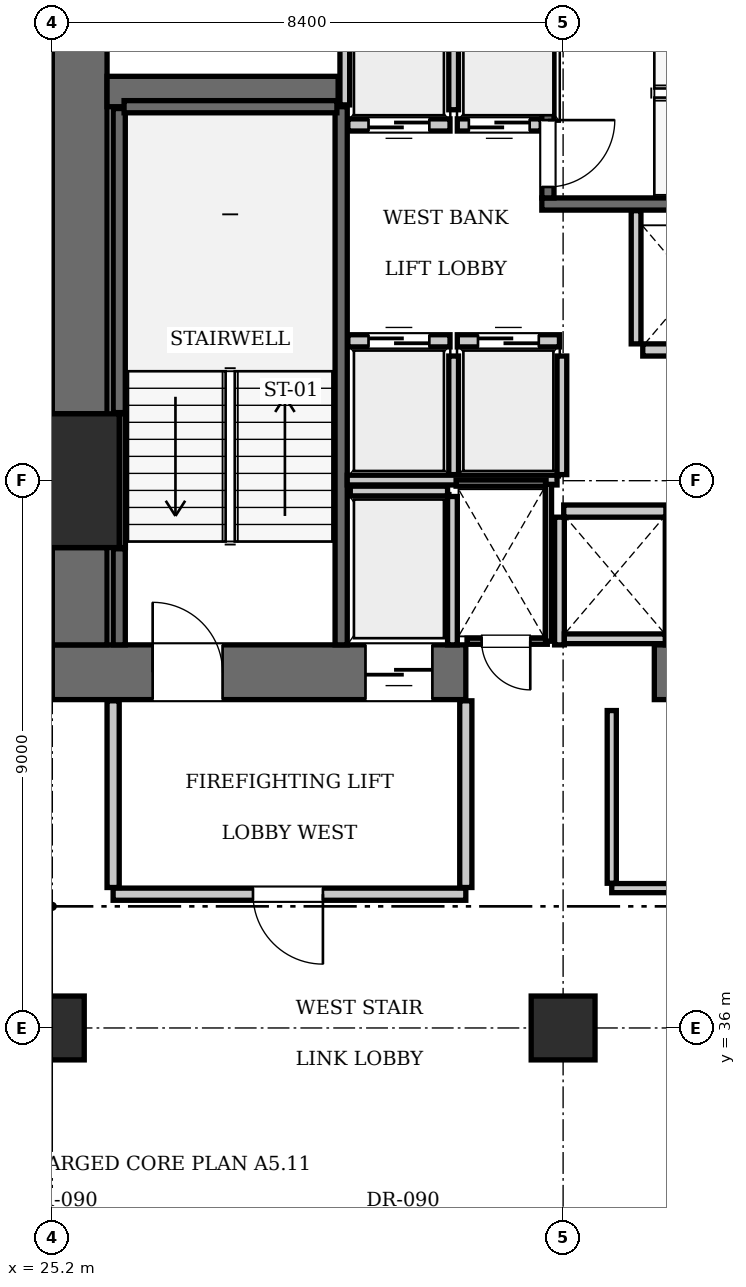
"""IFC4 building model, lengths in metres.
Left out: names, types, materials, properties, quantities, classifications, styles, units other than length and angle.
Written with IfcOpenShell. Run it as: python <this file> out.ifc"""

import sys

from ifc_helpers import new_model, si_unit, direction, frame, frame_2d, origin, origin_2d, place, context, subcontext, project, spatial, rectangle, extrude, element, fill, save


model = new_model("IFC4")
c1 = context("Model", 3, precision=1e-05, world=origin(), true_north=direction((0.0, 1.0)))
c2 = subcontext(c1, "Body", "Model", "MODEL_VIEW")
j1 = project(units=[si_unit("LENGTHUNIT", "METRE"), si_unit("PLANEANGLEUNIT", "RADIAN")], contexts=[c1])
p1 = place(None, origin())
s1 = spatial("IfcSite", under=j1, at=p1, CompositionType="ELEMENT")
p2 = place(p1, origin())
s2 = spatial("IfcBuilding", under=s1, at=p2, CompositionType="ELEMENT")
p3 = place(p2, frame((0.0, 0.0, 96.25)))
s3 = spatial("IfcBuildingStorey", under=s2, at=p3, CompositionType="ELEMENT", Elevation=96.25)
p4 = place(p3, frame((25.2, 45.0, 0.0), z_axis=(0.0, 0.0, 1.0), x_axis=(1.0, 0.0, 0.0)))
e1 = element("IfcColumn", 1, at=p4, inside=s3, PredefinedType="COLUMN", context=c2, shape_type="SweptSolid", body=[
    extrude(rectangle(XDim=2.2, YDim=2.2, at=origin_2d()), origin(), (0.0, 0.0, 1.0), 3.85),
])
p5 = place(p3, frame((25.2, 41.85, 0.0), z_axis=(0.0, 0.0, 1.0), x_axis=(1.0, 0.0, 0.0)))
e2 = element("IfcWall", 2, at=p5, inside=s3, PredefinedType="SHEAR", context=c2, shape_type="SweptSolid", body=[
    extrude(rectangle(XDim=6.8, YDim=0.9, at=frame_2d((3.4, 0.0))), origin(), (0.0, 0.0, 1.0), 3.85),
])
p6 = place(p5, frame((1.65, 0.0, 0.0)))
e3 = element("IfcOpeningElement", 3, at=p6, cuts=e2, PredefinedType="OPENING", context=c2, shape_type="SweptSolid", body=[
    extrude(rectangle(XDim=1.15, YDim=2.15, at=frame_2d((0.575, 1.075))), frame((0.0, 0.46, 0.0), z_axis=(0.0, -1.0, 0.0), x_axis=(1.0, 0.0, 0.0)), (0.0, 0.0, 1.0), 0.92),
])
p7 = place(p5, frame((5.15, 0.0, 0.0)))
e4 = element("IfcOpeningElement", 4, at=p7, cuts=e2, PredefinedType="OPENING", context=c2, shape_type="SweptSolid", body=[
    extrude(rectangle(XDim=1.1, YDim=2.2, at=frame_2d((0.55, 1.1))), frame((0.0, 0.46, 0.0), z_axis=(0.0, -1.0, 0.0), x_axis=(1.0, 0.0, 0.0)), (0.0, 0.0, 1.0), 0.92),
])
p8 = place(p3, frame((35.1, 41.85, 0.0), z_axis=(0.0, 0.0, 1.0), x_axis=(1.0, 0.0, 0.0)))
e5 = element("IfcWall", 5, at=p8, inside=s3, PredefinedType="SHEAR", context=c2, shape_type="SweptSolid", body=[
    extrude(rectangle(XDim=5.4, YDim=0.9, at=frame_2d((2.7, 0.0))), origin(), (0.0, 0.0, 1.0), 3.85),
])
p9 = place(p3, frame((25.65, 42.3, 0.0), z_axis=(0.0, 0.0, 1.0), x_axis=(0.0, 1.0, 0.0)))
e6 = element("IfcWall", 6, at=p9, inside=s3, PredefinedType="SHEAR", context=c2, shape_type="SweptSolid", body=[
    extrude(rectangle(XDim=1.6, YDim=0.9, at=frame_2d((0.8, 0.0))), origin(), (0.0, 0.0, 1.0), 3.85),
])
p10 = place(p3, frame((25.65, 46.1, 0.0), z_axis=(0.0, 0.0, 1.0), x_axis=(0.0, 1.0, 0.0)))
e7 = element("IfcWall", 7, at=p10, inside=s3, PredefinedType="SHEAR", context=c2, shape_type="SweptSolid", body=[
    extrude(rectangle(XDim=7.0, YDim=0.9, at=frame_2d((3.5, 0.0))), origin(), (0.0, 0.0, 1.0), 3.85),
])
p11 = place(p3, frame((26.1, 51.4, 0.0), z_axis=(0.0, 0.0, 1.0), x_axis=(1.0, 0.0, 0.0)))
e8 = element("IfcWall", 8, at=p11, inside=s3, PredefinedType="SHEAR", context=c2, shape_type="SweptSolid", body=[
    extrude(rectangle(XDim=3.8, YDim=0.5, at=frame_2d((1.9, 0.0))), origin(), (0.0, 0.0, 1.0), 3.85),
])
for number, where, z_axis, x_axis in (
    (9, (25.2, 36.0, 0.0), (0.0, 0.0, 1.0), (1.0, 0.0, 0.0)),
    (10, (33.6, 36.0, 0.0), (0.0, 0.0, 1.0), (1.0, 0.0, 0.0)),
):
    element("IfcColumn", number, at=place(p3, frame(where, z_axis=z_axis, x_axis=x_axis)), inside=s3, PredefinedType="COLUMN", context=c2, shape_type="SweptSolid", body=[
        extrude(rectangle(XDim=1.05, YDim=1.05, at=origin_2d()), origin(), (0.0, 0.0, 1.0), 3.85),
    ])
p12 = place(p3, frame((29.95, 42.3, 0.0), z_axis=(0.0, 0.0, 1.0), x_axis=(0.0, 1.0, 0.0)))
e11 = element("IfcWall", 11, at=p12, inside=s3, PredefinedType="SOLIDWALL", context=c2, shape_type="SweptSolid", body=[
    extrude(rectangle(XDim=8.85, YDim=0.2, at=frame_2d((4.425, 0.0))), origin(), (0.0, 0.0, 1.0), 3.61),
])
p13 = place(p3, frame((26.3, 42.3, 0.0), z_axis=(0.0, 0.0, 1.0), x_axis=(0.0, 1.0, 0.0)))
e12 = element("IfcWall", 12, at=p13, inside=s3, PredefinedType="SOLIDWALL", context=c2, shape_type="SweptSolid", body=[
    extrude(rectangle(XDim=1.58, YDim=0.2, at=frame_2d((0.79, 0.0))), origin(), (0.0, 0.0, 1.0), 3.61),
])
p14 = place(p3, frame((26.3, 46.12, 0.0), z_axis=(0.0, 0.0, 1.0), x_axis=(0.0, 1.0, 0.0)))
e13 = element("IfcWall", 13, at=p14, inside=s3, PredefinedType="SOLIDWALL", context=c2, shape_type="SweptSolid", body=[
    extrude(rectangle(XDim=5.0, YDim=0.2, at=frame_2d((2.5, 0.0))), origin(), (0.0, 0.0, 1.0), 3.61),
])
p15 = place(p3, frame((26.38, 51.15, 0.0), z_axis=(0.0, 0.0, 1.0), x_axis=(1.0, 0.0, 0.0)))
e14 = element("IfcWall", 14, at=p15, inside=s3, PredefinedType="SOLIDWALL", context=c2, shape_type="SweptSolid", body=[
    extrude(rectangle(XDim=3.5, YDim=0.2, at=frame_2d((1.75, 0.0))), origin(), (0.0, 0.0, 1.0), 3.61),
])
p16 = place(p3, frame((26.352, 43.9, 0.0), z_axis=(0.0, 0.0, 1.0), x_axis=(0.0, 1.0, 0.0)))
e15 = element("IfcWall", 15, at=p16, inside=s3, PredefinedType="SOLIDWALL", context=c2, shape_type="SweptSolid", body=[
    extrude(rectangle(XDim=2.2, YDim=0.1, at=frame_2d((1.1, 0.0))), origin(), (0.0, 0.0, 1.0), 3.61),
])
p17 = place(p3, frame((33.25, 49.55, 0.0), z_axis=(0.0, 0.0, 1.0), x_axis=(1.0, 0.0, 0.0)))
e16 = element("IfcWall", 16, at=p17, inside=s3, PredefinedType="SOLIDWALL", context=c2, shape_type="SweptSolid", body=[
    extrude(rectangle(XDim=9.1, YDim=0.2, at=frame_2d((4.55, 0.0))), origin(), (0.0, 0.0, 1.0), 3.61),
])
p18 = place(p3, frame((33.35, 49.65, 0.0), z_axis=(0.0, 0.0, 1.0), x_axis=(0.0, 1.0, 0.0)))
e17 = element("IfcWall", 17, at=p18, inside=s3, PredefinedType="SOLIDWALL", context=c2, shape_type="SweptSolid", body=[
    extrude(rectangle(XDim=3.45, YDim=0.2, at=frame_2d((1.725, 0.0))), origin(), (0.0, 0.0, 1.0), 3.61),
])
p19 = place(p18, frame((0.18, 0.0, 0.0)))
e18 = element("IfcOpeningElement", 18, at=p19, cuts=e17, PredefinedType="OPENING", context=c2, shape_type="SweptSolid", body=[
    extrude(rectangle(XDim=1.1, YDim=2.15, at=frame_2d((0.55, 1.075))), frame((0.0, 0.11, 0.0), z_axis=(0.0, -1.0, 0.0), x_axis=(1.0, 0.0, 0.0)), (0.0, 0.0, 1.0), 0.22),
])
p20 = place(p3, frame((30.06, 47.3, 0.0), z_axis=(0.0, 0.0, 1.0), x_axis=(1.0, 0.0, 0.0)))
e19 = element("IfcWall", 19, at=p20, inside=s3, PredefinedType="SOLIDWALL", context=c2, shape_type="SweptSolid", body=[
    extrude(rectangle(XDim=1.68, YDim=0.2, at=frame_2d((0.84, 0.0))), origin(), (0.0, 0.0, 1.0), 3.61),
])
p21 = place(p20, frame((0.34, 0.0, 0.0)))
e20 = element("IfcOpeningElement", 20, at=p21, cuts=e19, PredefinedType="OPENING", context=c2, shape_type="SweptSolid", body=[
    extrude(rectangle(XDim=1.0, YDim=2.15, at=frame_2d((0.5, 1.075))), frame((0.0, 0.11, 0.0), z_axis=(0.0, -1.0, 0.0), x_axis=(1.0, 0.0, 0.0)), (0.0, 0.0, 1.0), 0.22),
])
p22 = place(p3, frame((31.86, 47.3, 0.0), z_axis=(0.0, 0.0, 1.0), x_axis=(1.0, 0.0, 0.0)))
e21 = element("IfcWall", 21, at=p22, inside=s3, PredefinedType="SOLIDWALL", context=c2, shape_type="SweptSolid", body=[
    extrude(rectangle(XDim=1.68, YDim=0.2, at=frame_2d((0.84, 0.0))), origin(), (0.0, 0.0, 1.0), 3.61),
])
p23 = place(p22, frame((0.34, 0.0, 0.0)))
e22 = element("IfcOpeningElement", 22, at=p23, cuts=e21, PredefinedType="OPENING", context=c2, shape_type="SweptSolid", body=[
    extrude(rectangle(XDim=1.0, YDim=2.15, at=frame_2d((0.5, 1.075))), frame((0.0, 0.11, 0.0), z_axis=(0.0, -1.0, 0.0), x_axis=(1.0, 0.0, 0.0)), (0.0, 0.0, 1.0), 0.22),
])
p24 = place(p3, frame((30.06, 50.85, 0.0), z_axis=(0.0, 0.0, 1.0), x_axis=(1.0, 0.0, 0.0)))
e23 = element("IfcWall", 23, at=p24, inside=s3, PredefinedType="SOLIDWALL", context=c2, shape_type="SweptSolid", body=[
    extrude(rectangle(XDim=1.68, YDim=0.2, at=frame_2d((0.84, 0.0))), origin(), (0.0, 0.0, 1.0), 3.61),
])
p25 = place(p24, frame((0.34, 0.0, 0.0)))
e24 = element("IfcOpeningElement", 24, at=p25, cuts=e23, PredefinedType="OPENING", context=c2, shape_type="SweptSolid", body=[
    extrude(rectangle(XDim=1.0, YDim=2.15, at=frame_2d((0.5, 1.075))), frame((0.0, 0.11, 0.0), z_axis=(0.0, -1.0, 0.0), x_axis=(1.0, 0.0, 0.0)), (0.0, 0.0, 1.0), 0.22),
])
p26 = place(p3, frame((31.86, 50.85, 0.0), z_axis=(0.0, 0.0, 1.0), x_axis=(1.0, 0.0, 0.0)))
e25 = element("IfcWall", 25, at=p26, inside=s3, PredefinedType="SOLIDWALL", context=c2, shape_type="SweptSolid", body=[
    extrude(rectangle(XDim=1.38, YDim=0.2, at=frame_2d((0.69, 0.0))), origin(), (0.0, 0.0, 1.0), 3.61),
])
p27 = place(p26, frame((0.19, 0.0, 0.0)))
e26 = element("IfcOpeningElement", 26, at=p27, cuts=e25, PredefinedType="OPENING", context=c2, shape_type="SweptSolid", body=[
    extrude(rectangle(XDim=1.0, YDim=2.15, at=frame_2d((0.5, 1.075))), frame((0.0, 0.11, 0.0), z_axis=(0.0, -1.0, 0.0), x_axis=(1.0, 0.0, 0.0)), (0.0, 0.0, 1.0), 0.22),
])
p28 = place(p3, frame((34.91, 47.15, 0.0), z_axis=(0.0, 0.0, 1.0), x_axis=(1.0, 0.0, 0.0)))
e27 = element("IfcWall", 27, at=p28, inside=s3, PredefinedType="SOLIDWALL", context=c2, shape_type="SweptSolid", body=[
    extrude(rectangle(XDim=1.68, YDim=0.2, at=frame_2d((0.84, 0.0))), origin(), (0.0, 0.0, 1.0), 3.61),
])
p29 = place(p3, frame((33.61, 44.5, 0.0), z_axis=(0.0, 0.0, 1.0), x_axis=(1.0, 0.0, 0.0)))
e28 = element("IfcWall", 28, at=p29, inside=s3, PredefinedType="SOLIDWALL", context=c2, shape_type="SweptSolid", body=[
    extrude(rectangle(XDim=1.68, YDim=0.2, at=frame_2d((0.84, 0.0))), origin(), (0.0, 0.0, 1.0), 3.61),
])
p30 = place(p3, frame((30.1, 44.83, 0.0), z_axis=(0.0, 0.0, 1.0), x_axis=(1.0, 0.0, 0.0)))
e29 = element("IfcWall", 29, at=p30, inside=s3, PredefinedType="SOLIDWALL", context=c2, shape_type="SweptSolid", body=[
    extrude(rectangle(XDim=1.6, YDim=0.16, at=frame_2d((0.8, 0.0))), origin(), (0.0, 0.0, 1.0), 3.61),
])
p31 = place(p3, frame((31.78, 42.3, 0.0), z_axis=(0.0, 0.0, 1.0), x_axis=(0.0, 1.0, 0.0)))
e30 = element("IfcWall", 30, at=p31, inside=s3, PredefinedType="SOLIDWALL", context=c2, shape_type="SweptSolid", body=[
    extrude(rectangle(XDim=2.44, YDim=0.16, at=frame_2d((1.22, 0.0))), origin(), (0.0, 0.0, 1.0), 3.61),
])
for number, where, z_axis, x_axis in (
    (31, (31.8, 45.1, 0.0), (0.0, 0.0, 1.0), (0.0, 1.0, 0.0)),
    (32, (33.58, 45.1, 0.0), (0.0, 0.0, 1.0), (0.0, 1.0, 0.0)),
):
    element("IfcWall", number, at=place(p3, frame(where, z_axis=z_axis, x_axis=x_axis)), inside=s3, PredefinedType="SOLIDWALL", context=c2, shape_type="SweptSolid", body=[
        extrude(rectangle(XDim=1.95, YDim=0.16, at=frame_2d((0.975, 0.0))), origin(), (0.0, 0.0, 1.0), 3.61),
    ])
p32 = place(p3, frame((30.05, 45.01, 0.0), z_axis=(0.0, 0.0, 1.0), x_axis=(1.0, 0.0, 0.0)))
e33 = element("IfcWall", 33, at=p32, inside=s3, PredefinedType="SOLIDWALL", context=c2, shape_type="SweptSolid", body=[
    extrude(rectangle(XDim=3.45, YDim=0.16, at=frame_2d((1.725, 0.0))), origin(), (0.0, 0.0, 1.0), 3.61),
])
p33 = place(p3, frame((30.01, 51.18, 0.0), z_axis=(0.0, 0.0, 1.0), x_axis=(0.0, 1.0, 0.0)))
e34 = element("IfcWall", 34, at=p33, inside=s3, PredefinedType="SOLIDWALL", context=c2, shape_type="SweptSolid", body=[
    extrude(rectangle(XDim=1.92, YDim=0.16, at=frame_2d((0.96, 0.0))), origin(), (0.0, 0.0, 1.0), 3.61),
])
p34 = place(p3, frame((31.8, 51.1, 0.0), z_axis=(0.0, 0.0, 1.0), x_axis=(0.0, 1.0, 0.0)))
e35 = element("IfcWall", 35, at=p34, inside=s3, PredefinedType="SOLIDWALL", context=c2, shape_type="SweptSolid", body=[
    extrude(rectangle(XDim=2.0, YDim=0.16, at=frame_2d((1.0, 0.0))), origin(), (0.0, 0.0, 1.0), 3.61),
])
p35 = place(p3, frame((34.8, 47.25, 0.0), z_axis=(0.0, 0.0, 1.0), x_axis=(0.0, 1.0, 0.0)))
e36 = element("IfcWall", 36, at=p35, inside=s3, PredefinedType="SOLIDWALL", context=c2, shape_type="SweptSolid", body=[
    extrude(rectangle(XDim=2.19, YDim=0.16, at=frame_2d((1.095, 0.0))), origin(), (0.0, 0.0, 1.0), 3.61),
])
for number, where, z_axis, x_axis in (
    (37, (33.54, 42.3, 0.0), (0.0, 0.0, 1.0), (0.0, 1.0, 0.0)),
    (38, (35.36, 42.3, 0.0), (0.0, 0.0, 1.0), (0.0, 1.0, 0.0)),
):
    element("IfcWall", number, at=place(p3, frame(where, z_axis=z_axis, x_axis=x_axis)), inside=s3, PredefinedType="SOLIDWALL", context=c2, shape_type="SweptSolid", body=[
        extrude(rectangle(XDim=2.1, YDim=0.16, at=frame_2d((1.05, 0.0))), origin(), (0.0, 0.0, 1.0), 3.61),
    ])
p36 = place(p3, frame((33.62, 42.4, 0.0), z_axis=(0.0, 0.0, 1.0), x_axis=(1.0, 0.0, 0.0)))
e39 = element("IfcWall", 39, at=p36, inside=s3, PredefinedType="SOLIDWALL", context=c2, shape_type="SweptSolid", body=[
    extrude(rectangle(XDim=1.66, YDim=0.16, at=frame_2d((0.83, 0.0))), origin(), (0.0, 0.0, 1.0), 3.61),
])
p37 = place(p3, frame((26.2, 38.2, 0.0), z_axis=(0.0, 0.0, 1.0), x_axis=(1.0, 0.0, 0.0)))
e40 = element("IfcWall", 40, at=p37, inside=s3, PredefinedType="PARTITIONING", context=c2, shape_type="SweptSolid", body=[
    extrude(rectangle(XDim=5.8, YDim=0.2, at=frame_2d((2.9, 0.0))), origin(), (0.0, 0.0, 1.0), 3.61),
])
p38 = place(p37, frame((2.3, 0.0, 0.0)))
e41 = element("IfcOpeningElement", 41, at=p38, cuts=e40, PredefinedType="OPENING", context=c2, shape_type="SweptSolid", body=[
    extrude(rectangle(XDim=1.15, YDim=2.15, at=frame_2d((0.575, 1.075))), frame((0.0, 0.11, 0.0), z_axis=(0.0, -1.0, 0.0), x_axis=(1.0, 0.0, 0.0)), (0.0, 0.0, 1.0), 0.22),
])
for number, where, z_axis, x_axis in (
    (42, (26.2, 38.31, 0.0), (0.0, 0.0, 1.0), (0.0, 1.0, 0.0)),
    (43, (32.0, 38.31, 0.0), (0.0, 0.0, 1.0), (0.0, 1.0, 0.0)),
):
    element("IfcWall", number, at=place(p3, frame(where, z_axis=z_axis, x_axis=x_axis)), inside=s3, PredefinedType="PARTITIONING", context=c2, shape_type="SweptSolid", body=[
        extrude(rectangle(XDim=3.07, YDim=0.2, at=frame_2d((1.535, 0.0))), origin(), (0.0, 0.0, 1.0), 3.61),
    ])
p39 = place(p3, frame((32.02, 42.36, 0.0), z_axis=(0.0, 0.0, 1.0), x_axis=(1.0, 0.0, 0.0)))
e44 = element("IfcWall", 44, at=p39, inside=s3, PredefinedType="PARTITIONING", context=c2, shape_type="SweptSolid", body=[
    extrude(rectangle(XDim=1.32, YDim=0.1, at=frame_2d((0.66, 0.0))), origin(), (0.0, 0.0, 1.0), 3.61),
])
p40 = place(p39, frame((0.24, 0.0, 0.0)))
e45 = element("IfcOpeningElement", 45, at=p40, cuts=e44, PredefinedType="OPENING", context=c2, shape_type="SweptSolid", body=[
    extrude(rectangle(XDim=0.8, YDim=2.05, at=frame_2d((0.4, 1.025))), frame((0.0, 0.06, 0.0), z_axis=(0.0, -1.0, 0.0), x_axis=(1.0, 0.0, 0.0)), (0.0, 0.0, 1.0), 0.12),
])
p41 = place(p3, frame((31.84, 44.96, 0.0), z_axis=(0.0, 0.0, 1.0), x_axis=(1.0, 0.0, 0.0)))
e46 = element("IfcWall", 46, at=p41, inside=s3, PredefinedType="PARTITIONING", context=c2, shape_type="SweptSolid", body=[
    extrude(rectangle(XDim=1.48, YDim=0.1, at=frame_2d((0.74, 0.0))), origin(), (0.0, 0.0, 1.0), 3.61),
])
p42 = place(p3, frame((33.36, 42.36, 0.0), z_axis=(0.0, 0.0, 1.0), x_axis=(0.0, 1.0, 0.0)))
e47 = element("IfcWall", 47, at=p42, inside=s3, PredefinedType="PARTITIONING", context=c2, shape_type="SweptSolid", body=[
    extrude(rectangle(XDim=2.58, YDim=0.1, at=frame_2d((1.29, 0.0))), origin(), (0.0, 0.0, 1.0), 3.61),
])
p43 = place(p3, frame((34.4, 38.3, 0.0), z_axis=(0.0, 0.0, 1.0), x_axis=(1.0, 0.0, 0.0)))
e48 = element("IfcWall", 48, at=p43, inside=s3, PredefinedType="PARTITIONING", context=c2, shape_type="SweptSolid", body=[
    extrude(rectangle(XDim=2.88, YDim=0.15, at=frame_2d((1.44, 0.0))), origin(), (0.0, 0.0, 1.0), 3.61),
])
p44 = place(p43, frame((1.0, 0.0, 0.0)))
e49 = element("IfcOpeningElement", 49, at=p44, cuts=e48, PredefinedType="OPENING", context=c2, shape_type="SweptSolid", body=[
    extrude(rectangle(XDim=0.8, YDim=2.05, at=frame_2d((0.4, 1.025))), frame((0.0, 0.085, 0.0), z_axis=(0.0, -1.0, 0.0), x_axis=(1.0, 0.0, 0.0)), (0.0, 0.0, 1.0), 0.17),
])
p45 = place(p3, frame((34.4, 38.38, 0.0), z_axis=(0.0, 0.0, 1.0), x_axis=(0.0, 1.0, 0.0)))
e50 = element("IfcWall", 50, at=p45, inside=s3, PredefinedType="PARTITIONING", context=c2, shape_type="SweptSolid", body=[
    extrude(rectangle(XDim=2.84, YDim=0.15, at=frame_2d((1.42, 0.0))), origin(), (0.0, 0.0, 1.0), 3.61),
])
p46 = place(p6, origin())
e51 = element("IfcDoor", 51, at=p46, inside=s3, OperationType="SINGLE_SWING_LEFT", PredefinedType="DOOR", context=c2, shape_type="SweptSolid", body=[
    extrude(rectangle(XDim=1.15, YDim=2.15, at=frame_2d((0.575, 1.075))), frame((0.0, 0.025, 0.0), z_axis=(0.0, -1.0, 0.0), x_axis=(1.0, 0.0, 0.0)), (0.0, 0.0, 1.0), 0.05),
])
fill(e3, e51)
p47 = place(p19, frame((1.1, 0.0, 0.0), z_axis=(0.0, 0.0, 1.0), x_axis=(-1.0, 0.0, 0.0)))
e52 = element("IfcDoor", 52, at=p47, inside=s3, OperationType="SINGLE_SWING_LEFT", PredefinedType="DOOR", context=c2, shape_type="SweptSolid", body=[
    extrude(rectangle(XDim=1.1, YDim=2.15, at=frame_2d((0.55, 1.075))), frame((0.0, 0.025, 0.0), z_axis=(0.0, -1.0, 0.0), x_axis=(1.0, 0.0, 0.0)), (0.0, 0.0, 1.0), 0.05),
])
fill(e18, e52)
p48 = place(p21, origin())
e53 = element("IfcDoor", 53, at=p48, inside=s3, OperationType="SLIDING_TO_LEFT", PredefinedType="DOOR", context=c2, shape_type="SweptSolid", body=[
    extrude(rectangle(XDim=1.0, YDim=2.15, at=frame_2d((0.5, 1.075))), frame((0.0, 0.025, 0.0), z_axis=(0.0, -1.0, 0.0), x_axis=(1.0, 0.0, 0.0)), (0.0, 0.0, 1.0), 0.05),
])
fill(e20, e53)
p49 = place(p23, origin())
e54 = element("IfcDoor", 54, at=p49, inside=s3, OperationType="SLIDING_TO_LEFT", PredefinedType="DOOR", context=c2, shape_type="SweptSolid", body=[
    extrude(rectangle(XDim=1.0, YDim=2.15, at=frame_2d((0.5, 1.075))), frame((0.0, 0.025, 0.0), z_axis=(0.0, -1.0, 0.0), x_axis=(1.0, 0.0, 0.0)), (0.0, 0.0, 1.0), 0.05),
])
fill(e22, e54)
p50 = place(p25, frame((1.0, 0.0, 0.0), z_axis=(0.0, 0.0, 1.0), x_axis=(-1.0, 0.0, 0.0)))
e55 = element("IfcDoor", 55, at=p50, inside=s3, OperationType="SLIDING_TO_LEFT", PredefinedType="DOOR", context=c2, shape_type="SweptSolid", body=[
    extrude(rectangle(XDim=1.0, YDim=2.15, at=frame_2d((0.5, 1.075))), frame((0.0, 0.025, 0.0), z_axis=(0.0, -1.0, 0.0), x_axis=(1.0, 0.0, 0.0)), (0.0, 0.0, 1.0), 0.05),
])
fill(e24, e55)
p51 = place(p27, frame((1.0, 0.0, 0.0), z_axis=(0.0, 0.0, 1.0), x_axis=(-1.0, 0.0, 0.0)))
e56 = element("IfcDoor", 56, at=p51, inside=s3, OperationType="SLIDING_TO_LEFT", PredefinedType="DOOR", context=c2, shape_type="SweptSolid", body=[
    extrude(rectangle(XDim=1.0, YDim=2.15, at=frame_2d((0.5, 1.075))), frame((0.0, 0.025, 0.0), z_axis=(0.0, -1.0, 0.0), x_axis=(1.0, 0.0, 0.0)), (0.0, 0.0, 1.0), 0.05),
])
fill(e26, e56)
p52 = place(p7, frame((1.1, 0.0, 0.0), z_axis=(0.0, 0.0, 1.0), x_axis=(-1.0, 0.0, 0.0)))
e57 = element("IfcDoor", 57, at=p52, inside=s3, OperationType="SLIDING_TO_LEFT", PredefinedType="DOOR", context=c2, shape_type="SweptSolid", body=[
    extrude(rectangle(XDim=1.1, YDim=2.2, at=frame_2d((0.55, 1.1))), frame((0.0, 0.025, 0.0), z_axis=(0.0, -1.0, 0.0), x_axis=(1.0, 0.0, 0.0)), (0.0, 0.0, 1.0), 0.05),
])
fill(e4, e57)
p53 = place(p38, frame((1.15, 0.0, 0.0), z_axis=(0.0, 0.0, 1.0), x_axis=(-1.0, 0.0, 0.0)))
e58 = element("IfcDoor", 58, at=p53, inside=s3, OperationType="SINGLE_SWING_LEFT", PredefinedType="DOOR", context=c2, shape_type="SweptSolid", body=[
    extrude(rectangle(XDim=1.15, YDim=2.15, at=frame_2d((0.575, 1.075))), frame((0.0, 0.025, 0.0), z_axis=(0.0, -1.0, 0.0), x_axis=(1.0, 0.0, 0.0)), (0.0, 0.0, 1.0), 0.05),
])
fill(e41, e58)
p54 = place(p40, frame((0.8, 0.0, 0.0), z_axis=(0.0, 0.0, 1.0), x_axis=(-1.0, 0.0, 0.0)))
e59 = element("IfcDoor", 59, at=p54, inside=s3, OperationType="SINGLE_SWING_LEFT", PredefinedType="DOOR", context=c2, shape_type="SweptSolid", body=[
    extrude(rectangle(XDim=0.8, YDim=2.05, at=frame_2d((0.4, 1.025))), frame((0.0, 0.025, 0.0), z_axis=(0.0, -1.0, 0.0), x_axis=(1.0, 0.0, 0.0)), (0.0, 0.0, 1.0), 0.05),
])
fill(e45, e59)
save(model, sys.argv[1])
